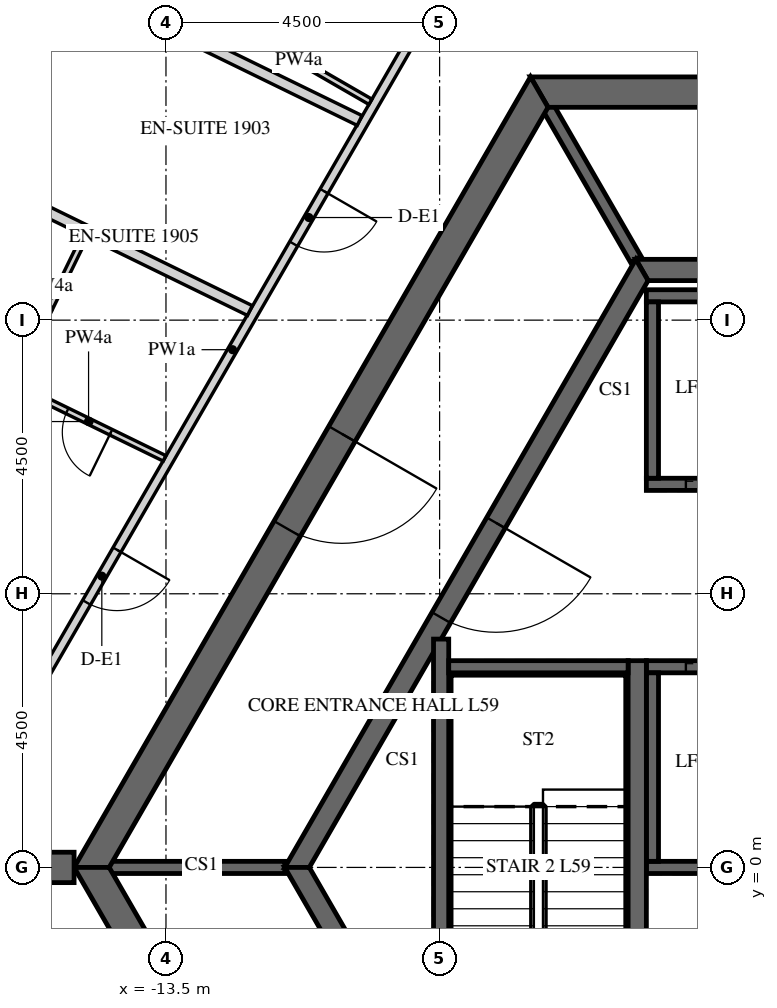
"""IFC4 building model, lengths in metres.
Left out: names, types, materials, properties, quantities, classifications, styles, units other than length and angle.
Written with IfcOpenShell. Run it as: python <this file> out.ifc"""

import sys

from ifc_helpers import new_model, si_unit, direction, frame, frame_2d, origin, place, context, subcontext, project, spatial, polyline, rectangle, outline, extrude, element, fill, save


model = new_model("IFC4")
c1 = context("Model", 3, precision=1e-05, world=origin(), true_north=direction((0.0, 1.0)))
c2 = subcontext(c1, "Body", "Model", "MODEL_VIEW")
j1 = project(units=[si_unit("LENGTHUNIT", "METRE"), si_unit("PLANEANGLEUNIT", "RADIAN")], contexts=[c1])
p1 = place(None, origin())
s1 = spatial("IfcSite", under=j1, at=p1, CompositionType="ELEMENT")
p2 = place(p1, origin())
s2 = spatial("IfcBuilding", under=s1, at=p2, CompositionType="ELEMENT")
p3 = place(p2, frame((0.0, 0.0, 246.3)))
s3 = spatial("IfcBuildingStorey", under=s2, at=p3, CompositionType="ELEMENT", Elevation=246.3)
p4 = place(p3, frame((-7.361, 12.75, -0.15), z_axis=(0.0, 0.0, 1.0), x_axis=(-0.50000571537, -0.866022103989, 0.0)))
e1 = element("IfcWall", 1, at=p4, inside=s3, PredefinedType="SHEAR", context=c2, shape_type="SweptSolid", body=[
    extrude(outline(polyline([(-0.144, -0.25), (14.867, -0.25), (14.578, 0.25), (0.144, 0.25), (-0.144, -0.25)])), origin(), (0.0, 0.0, 1.0), 3.75),
])
p5 = place(p4, frame((6.49, 0.0, 0.15)))
e2 = element("IfcOpeningElement", 2, at=p5, cuts=e1, PredefinedType="OPENING", context=c2, shape_type="SweptSolid", body=[
    extrude(rectangle(XDim=1.8, YDim=2.4, at=frame_2d((0.9, 1.2))), frame((0.0, 0.26, 0.0), z_axis=(0.0, -1.0, 0.0), x_axis=(1.0, 0.0, 0.0)), (0.0, 0.0, 1.0), 0.52),
])
p6 = place(p3, frame((-14.722, 0.0, -0.15), z_axis=(0.0, 0.0, 1.0), x_axis=(0.50000571537, -0.866022103989, 0.0)))
e3 = element("IfcWall", 3, at=p6, inside=s3, PredefinedType="SHEAR", context=c2, shape_type="SweptSolid", body=[
    extrude(outline(polyline([(-0.144, -0.25), (14.867, -0.25), (14.578, 0.25), (0.144, 0.25), (-0.144, -0.25)])), origin(), (0.0, 0.0, 1.0), 3.75),
])
p7 = place(p6, frame((6.432, 0.0, 0.15)))
e4 = element("IfcOpeningElement", 4, at=p7, cuts=e3, PredefinedType="OPENING", context=c2, shape_type="SweptSolid", body=[
    extrude(rectangle(XDim=1.8, YDim=2.4, at=frame_2d((0.9, 1.2))), frame((0.0, 0.26, 0.0), z_axis=(0.0, -1.0, 0.0), x_axis=(1.0, 0.0, 0.0)), (0.0, 0.0, 1.0), 0.52),
])
p8 = place(p3, frame((7.361, 12.75, -0.15), z_axis=(0.0, 0.0, 1.0), x_axis=(-1.0, 0.0, 0.0)))
e5 = element("IfcWall", 5, at=p8, inside=s3, PredefinedType="SHEAR", context=c2, shape_type="SweptSolid", body=[
    extrude(outline(polyline([(-0.144, -0.25), (14.866, -0.25), (14.578, 0.25), (0.144, 0.25), (-0.144, -0.25)])), origin(), (0.0, 0.0, 1.0), 3.75),
])
p9 = place(p8, frame((6.761, 0.0, 0.15)))
e6 = element("IfcOpeningElement", 6, at=p9, cuts=e5, PredefinedType="OPENING", context=c2, shape_type="SweptSolid", body=[
    extrude(rectangle(XDim=1.2, YDim=2.4, at=frame_2d((0.6, 1.2))), frame((0.0, 0.26, 0.0), z_axis=(0.0, -1.0, 0.0), x_axis=(1.0, 0.0, 0.0)), (0.0, 0.0, 1.0), 0.52),
])
p10 = place(p3, frame((-15.011, 0.0, -0.15), z_axis=(0.0, 0.0, 1.0), x_axis=(-1.0, 0.0, 0.0)))
e7 = element("IfcWall", 7, at=p10, inside=s3, PredefinedType="SHEAR", context=c2, shape_type="SweptSolid", body=[
    extrude(rectangle(XDim=15.424, YDim=0.5, at=frame_2d((7.712, 0.0))), origin(), (0.0, 0.0, 1.0), 3.75),
])
p11 = place(p10, frame((6.812, 0.0, 0.15)))
e8 = element("IfcOpeningElement", 8, at=p11, cuts=e7, PredefinedType="OPENING", context=c2, shape_type="SweptSolid", body=[
    extrude(rectangle(XDim=1.8, YDim=2.4, at=frame_2d((0.9, 1.2))), frame((0.0, 0.26, 0.0), z_axis=(0.0, -1.0, 0.0), x_axis=(1.0, 0.0, 0.0)), (0.0, 0.0, 1.0), 0.52),
])
p12 = place(p3, frame((-5.673, 9.825, -0.15), z_axis=(0.0, 0.0, 1.0), x_axis=(-0.499995046907, -0.866028263435, 0.0)))
e9 = element("IfcWall", 9, at=p12, inside=s3, PredefinedType="SHEAR", context=c2, shape_type="SweptSolid", body=[
    extrude(outline(polyline([(-0.101, -0.175), (11.446, -0.175), (11.244, 0.175), (0.101, 0.175), (-0.101, -0.175)])), origin(), (0.0, 0.0, 1.0), 3.75),
])
p13 = place(p12, frame((4.801, 0.0, 0.15)))
e10 = element("IfcOpeningElement", 10, at=p13, cuts=e9, PredefinedType="OPENING", context=c2, shape_type="SweptSolid", body=[
    extrude(rectangle(XDim=1.8, YDim=2.4, at=frame_2d((0.9, 1.2))), frame((0.0, 0.185, 0.0), z_axis=(0.0, -1.0, 0.0), x_axis=(1.0, 0.0, 0.0)), (0.0, 0.0, 1.0), 0.37),
])
p14 = place(p3, frame((-11.345, 0.0, -0.15), z_axis=(0.0, 0.0, 1.0), x_axis=(0.499995046907, -0.866028263435, 0.0)))
e11 = element("IfcWall", 11, at=p14, inside=s3, PredefinedType="SHEAR", context=c2, shape_type="SweptSolid", body=[
    extrude(outline(polyline([(-0.101, -0.175), (11.446, -0.175), (11.244, 0.175), (0.101, 0.175), (-0.101, -0.175)])), origin(), (0.0, 0.0, 1.0), 3.75),
])
p15 = place(p14, frame((4.744, 0.0, 0.15)))
e12 = element("IfcOpeningElement", 12, at=p15, cuts=e11, PredefinedType="OPENING", context=c2, shape_type="SweptSolid", body=[
    extrude(rectangle(XDim=1.8, YDim=2.4, at=frame_2d((0.9, 1.2))), frame((0.0, 0.185, 0.0), z_axis=(0.0, -1.0, 0.0), x_axis=(1.0, 0.0, 0.0)), (0.0, 0.0, 1.0), 0.37),
])
p16 = place(p3, frame((5.673, 9.825, -0.15), z_axis=(0.0, 0.0, 1.0), x_axis=(-1.0, 0.0, 0.0)))
e13 = element("IfcWall", 13, at=p16, inside=s3, PredefinedType="SHEAR", context=c2, shape_type="SweptSolid", body=[
    extrude(outline(polyline([(-0.101, -0.175), (11.446, -0.175), (11.244, 0.175), (0.101, 0.175), (-0.101, -0.175)])), origin(), (0.0, 0.0, 1.0), 3.75),
])
p17 = place(p3, frame((-5.6, 6.3, -0.25), z_axis=(0.0, 0.0, 1.0), x_axis=(1.0, 0.0, 0.0)))
e14 = element("IfcWall", 14, at=p17, inside=s3, PredefinedType="SHEAR", context=c2, shape_type="SweptSolid", body=[
    extrude(rectangle(XDim=11.2, YDim=0.2, at=frame_2d((5.6, 0.0))), origin(), (0.0, 0.0, 1.0), 3.9),
])
p18 = place(p17, frame((8.45, 0.0, 0.25)))
e15 = element("IfcOpeningElement", 15, at=p18, cuts=e14, PredefinedType="OPENING", context=c2, shape_type="SweptSolid", body=[
    extrude(rectangle(XDim=0.9, YDim=2.1, at=frame_2d((0.45, 1.05))), frame((0.0, 0.11, 0.0), z_axis=(0.0, -1.0, 0.0), x_axis=(1.0, 0.0, 0.0)), (0.0, 0.0, 1.0), 0.22),
])
p19 = place(p17, frame((0.65, 0.0, 0.25)))
e16 = element("IfcOpeningElement", 16, at=p19, cuts=e14, PredefinedType="OPENING", context=c2, shape_type="SweptSolid", body=[
    extrude(rectangle(XDim=1.1, YDim=2.1, at=frame_2d((0.55, 1.05))), frame((0.0, 0.11, 0.0), z_axis=(0.0, -1.0, 0.0), x_axis=(1.0, 0.0, 0.0)), (0.0, 0.0, 1.0), 0.22),
])
p20 = place(p17, frame((2.85, 0.0, 0.25)))
e17 = element("IfcOpeningElement", 17, at=p20, cuts=e14, PredefinedType="OPENING", context=c2, shape_type="SweptSolid", body=[
    extrude(rectangle(XDim=1.1, YDim=2.1, at=frame_2d((0.55, 1.05))), frame((0.0, 0.11, 0.0), z_axis=(0.0, -1.0, 0.0), x_axis=(1.0, 0.0, 0.0)), (0.0, 0.0, 1.0), 0.22),
])
p21 = place(p17, frame((5.05, 0.0, 0.25)))
e18 = element("IfcOpeningElement", 18, at=p21, cuts=e14, PredefinedType="OPENING", context=c2, shape_type="SweptSolid", body=[
    extrude(rectangle(XDim=1.1, YDim=2.1, at=frame_2d((0.55, 1.05))), frame((0.0, 0.11, 0.0), z_axis=(0.0, -1.0, 0.0), x_axis=(1.0, 0.0, 0.0)), (0.0, 0.0, 1.0), 0.22),
])
p22 = place(p3, frame((-5.6, 9.4, -0.25), z_axis=(0.0, 0.0, 1.0), x_axis=(1.0, 0.0, 0.0)))
e19 = element("IfcWall", 19, at=p22, inside=s3, PredefinedType="SHEAR", context=c2, shape_type="SweptSolid", body=[
    extrude(rectangle(XDim=11.2, YDim=0.2, at=frame_2d((5.6, 0.0))), origin(), (0.0, 0.0, 1.0), 3.9),
])
p23 = place(p3, frame((-5.5, 6.4, -0.25), z_axis=(0.0, 0.0, 1.0), x_axis=(0.0, 1.0, 0.0)))
e20 = element("IfcWall", 20, at=p23, inside=s3, PredefinedType="SHEAR", context=c2, shape_type="SweptSolid", body=[
    extrude(rectangle(XDim=2.9, YDim=0.2, at=frame_2d((1.45, 0.0))), origin(), (0.0, 0.0, 1.0), 3.9),
])
p24 = place(p3, frame((-5.6, 3.3, -0.25), z_axis=(0.0, 0.0, 1.0), x_axis=(1.0, 0.0, 0.0)))
e21 = element("IfcWall", 21, at=p24, inside=s3, PredefinedType="SHEAR", context=c2, shape_type="SweptSolid", body=[
    extrude(rectangle(XDim=11.2, YDim=0.2, at=frame_2d((5.6, 0.0))), origin(), (0.0, 0.0, 1.0), 3.9),
])
p25 = place(p24, frame((0.65, 0.0, 0.25)))
e22 = element("IfcOpeningElement", 22, at=p25, cuts=e21, PredefinedType="OPENING", context=c2, shape_type="SweptSolid", body=[
    extrude(rectangle(XDim=1.1, YDim=2.1, at=frame_2d((0.55, 1.05))), frame((0.0, 0.11, 0.0), z_axis=(0.0, -1.0, 0.0), x_axis=(1.0, 0.0, 0.0)), (0.0, 0.0, 1.0), 0.22),
])
p26 = place(p24, frame((2.85, 0.0, 0.25)))
e23 = element("IfcOpeningElement", 23, at=p26, cuts=e21, PredefinedType="OPENING", context=c2, shape_type="SweptSolid", body=[
    extrude(rectangle(XDim=1.1, YDim=2.1, at=frame_2d((0.55, 1.05))), frame((0.0, 0.11, 0.0), z_axis=(0.0, -1.0, 0.0), x_axis=(1.0, 0.0, 0.0)), (0.0, 0.0, 1.0), 0.22),
])
p27 = place(p24, frame((5.05, 0.0, 0.25)))
e24 = element("IfcOpeningElement", 24, at=p27, cuts=e21, PredefinedType="OPENING", context=c2, shape_type="SweptSolid", body=[
    extrude(rectangle(XDim=1.1, YDim=2.1, at=frame_2d((0.55, 1.05))), frame((0.0, 0.11, 0.0), z_axis=(0.0, -1.0, 0.0), x_axis=(1.0, 0.0, 0.0)), (0.0, 0.0, 1.0), 0.22),
])
p28 = place(p24, frame((7.25, 0.0, 0.25)))
e25 = element("IfcOpeningElement", 25, at=p28, cuts=e21, PredefinedType="OPENING", context=c2, shape_type="SweptSolid", body=[
    extrude(rectangle(XDim=1.1, YDim=2.1, at=frame_2d((0.55, 1.05))), frame((0.0, 0.11, 0.0), z_axis=(0.0, -1.0, 0.0), x_axis=(1.0, 0.0, 0.0)), (0.0, 0.0, 1.0), 0.22),
])
p29 = place(p24, frame((9.45, 0.0, 0.25)))
e26 = element("IfcOpeningElement", 26, at=p29, cuts=e21, PredefinedType="OPENING", context=c2, shape_type="SweptSolid", body=[
    extrude(rectangle(XDim=1.1, YDim=2.1, at=frame_2d((0.55, 1.05))), frame((0.0, 0.11, 0.0), z_axis=(0.0, -1.0, 0.0), x_axis=(1.0, 0.0, 0.0)), (0.0, 0.0, 1.0), 0.22),
])
p30 = place(p3, frame((-5.6, 0.0, -0.25), z_axis=(0.0, 0.0, 1.0), x_axis=(1.0, 0.0, 0.0)))
e27 = element("IfcWall", 27, at=p30, inside=s3, PredefinedType="SHEAR", context=c2, shape_type="SweptSolid", body=[
    extrude(rectangle(XDim=11.2, YDim=0.2, at=frame_2d((5.6, 0.0))), origin(), (0.0, 0.0, 1.0), 3.9),
])
p31 = place(p3, frame((-5.5, 0.1, -0.25), z_axis=(0.0, 0.0, 1.0), x_axis=(0.0, 1.0, 0.0)))
e28 = element("IfcWall", 28, at=p31, inside=s3, PredefinedType="SHEAR", context=c2, shape_type="SweptSolid", body=[
    extrude(rectangle(XDim=3.1, YDim=0.2, at=frame_2d((1.55, 0.0))), origin(), (0.0, 0.0, 1.0), 3.9),
])
for number, where, z_axis, x_axis in (
    (29, (-5.773, 10.0, -0.15), (0.0, 0.0, 1.0), (-0.5, 0.866, 0.0)),
    (30, (-11.547, 0.0, -0.15), (0.0, 0.0, 1.0), (-1.0, 0.0, 0.0)),
):
    element("IfcWall", number, at=place(p3, frame(where, z_axis=z_axis, x_axis=x_axis)), inside=s3, PredefinedType="SHEAR", context=c2, shape_type="SweptSolid", body=[
        extrude(rectangle(XDim=2.887, YDim=0.2, at=frame_2d((1.443, 0.0))), origin(), (0.0, 0.0, 1.0), 3.75),
    ])
p32 = place(p3, frame((-5.75, -3.4, -0.25), z_axis=(0.0, 0.0, 1.0), x_axis=(0.0, 1.0, 0.0)))
e31 = element("IfcWall", 31, at=p32, inside=s3, PredefinedType="SHEAR", context=c2, shape_type="SweptSolid", body=[
    extrude(rectangle(XDim=6.8, YDim=0.3, at=frame_2d((3.4, 0.0))), origin(), (0.0, 0.0, 1.0), 3.9),
])
p33 = place(p3, frame((-8.975, -3.755, -0.25), z_axis=(0.0, 0.0, 1.0), x_axis=(0.0, 1.0, 0.0)))
e32 = element("IfcWall", 32, at=p33, inside=s3, PredefinedType="SHEAR", context=c2, shape_type="SweptSolid", body=[
    extrude(rectangle(XDim=7.51, YDim=0.25, at=frame_2d((3.755, 0.0))), origin(), (0.0, 0.0, 1.0), 3.9),
])
p34 = place(p3, frame((-8.85, 3.3, -0.25), z_axis=(0.0, 0.0, 1.0), x_axis=(1.0, 0.0, 0.0)))
e33 = element("IfcWall", 33, at=p34, inside=s3, PredefinedType="SHEAR", context=c2, shape_type="SweptSolid", body=[
    extrude(rectangle(XDim=2.95, YDim=0.2, at=frame_2d((1.475, 0.0))), origin(), (0.0, 0.0, 1.0), 3.9),
])
p35 = place(p3, frame((-8.673, 14.978, 0.0), z_axis=(0.0, 0.0, 1.0), x_axis=(-0.50000700621, -0.86602135871, 0.0)))
e34 = element("IfcWall", 34, at=p35, inside=s3, PredefinedType="PARTITIONING", context=c2, shape_type="SweptSolid", body=[
    extrude(rectangle(XDim=14.928, YDim=0.15, at=frame_2d((7.464, 0.0))), origin(), (0.0, 0.0, 1.0), 2.838),
])
p36 = place(p35, frame((4.454, 0.0, 0.0)))
e35 = element("IfcOpeningElement", 35, at=p36, cuts=e34, PredefinedType="OPENING", context=c2, shape_type="SweptSolid", body=[
    extrude(rectangle(XDim=1.0, YDim=2.1, at=frame_2d((0.5, 1.05))), frame((0.0, 0.085, 0.0), z_axis=(0.0, -1.0, 0.0), x_axis=(1.0, 0.0, 0.0)), (0.0, 0.0, 1.0), 0.17),
])
p37 = place(p35, frame((11.264, 0.0, 0.0)))
e36 = element("IfcOpeningElement", 36, at=p37, cuts=e34, PredefinedType="OPENING", context=c2, shape_type="SweptSolid", body=[
    extrude(rectangle(XDim=1.0, YDim=2.1, at=frame_2d((0.5, 1.05))), frame((0.0, 0.085, 0.0), z_axis=(0.0, -1.0, 0.0), x_axis=(1.0, 0.0, 0.0)), (0.0, 0.0, 1.0), 0.17),
])
p38 = place(p3, frame((-10.138, 12.591, 0.0), z_axis=(0.0, 0.0, 1.0), x_axis=(-0.866051307416, 0.49995513091, 0.0)))
e37 = element("IfcWall", 37, at=p38, inside=s3, PredefinedType="PARTITIONING", context=c2, shape_type="SweptSolid", body=[
    extrude(rectangle(XDim=2.725, YDim=0.1, at=frame_2d((1.362, 0.0))), origin(), (0.0, 0.0, 1.0), 2.838),
])
p39 = place(p3, frame((-21.815, 17.892, 0.0), z_axis=(0.0, 0.0, 1.0), x_axis=(0.898799253997, -0.438360469265, 0.0)))
e38 = element("IfcWall", 38, at=p39, inside=s3, PredefinedType="PARTITIONING", context=c2, shape_type="SweptSolid", body=[
    extrude(rectangle(XDim=12.794, YDim=0.18, at=frame_2d((6.397, 0.0))), origin(), (0.0, 0.0, 1.0), 2.838),
])
p40 = place(p3, frame((-23.393, 14.656, 0.0), z_axis=(0.0, 0.0, 1.0), x_axis=(0.898790706576, -0.43837799417, 0.0)))
e39 = element("IfcWall", 39, at=p40, inside=s3, PredefinedType="PARTITIONING", context=c2, shape_type="SweptSolid", body=[
    extrude(rectangle(XDim=12.542, YDim=0.18, at=frame_2d((6.271, 0.0))), origin(), (0.0, 0.0, 1.0), 2.838),
])
p41 = place(p3, frame((-13.523, 6.727, 0.0), z_axis=(0.0, 0.0, 1.0), x_axis=(-0.89880809785, 0.438342335668, 0.0)))
e40 = element("IfcWall", 40, at=p41, inside=s3, PredefinedType="PARTITIONING", context=c2, shape_type="SweptSolid", body=[
    extrude(rectangle(XDim=2.781, YDim=0.1, at=frame_2d((1.391, 0.0))), origin(), (0.0, 0.0, 1.0), 2.838),
])
p42 = place(p41, frame((0.981, 0.0, 0.0)))
e41 = element("IfcOpeningElement", 41, at=p42, cuts=e40, PredefinedType="OPENING", context=c2, shape_type="SweptSolid", body=[
    extrude(rectangle(XDim=0.8, YDim=2.1, at=frame_2d((0.4, 1.05))), frame((0.0, 0.06, 0.0), z_axis=(0.0, -1.0, 0.0), x_axis=(1.0, 0.0, 0.0)), (0.0, 0.0, 1.0), 0.12),
])
p43 = place(p3, frame((-16.001, 7.991, 0.0), z_axis=(0.0, 0.0, 1.0), x_axis=(0.438344066549, 0.89880725371, 0.0)))
e42 = element("IfcWall", 42, at=p43, inside=s3, PredefinedType="PARTITIONING", context=c2, shape_type="SweptSolid", body=[
    extrude(rectangle(XDim=2.66, YDim=0.1, at=frame_2d((1.33, 0.0))), origin(), (0.0, 0.0, 1.0), 2.838),
])
p44 = place(p5, origin())
e43 = element("IfcDoor", 43, at=p44, inside=s3, OperationType="DOUBLE_DOOR_SINGLE_SWING", PredefinedType="DOOR", context=c2, shape_type="SweptSolid", body=[
    extrude(rectangle(XDim=1.8, YDim=2.4, at=frame_2d((0.9, 1.2))), frame((0.0, 0.025, 0.0), z_axis=(0.0, -1.0, 0.0), x_axis=(1.0, 0.0, 0.0)), (0.0, 0.0, 1.0), 0.05),
])
fill(e2, e43)
p45 = place(p13, origin())
e44 = element("IfcDoor", 44, at=p45, inside=s3, OperationType="DOUBLE_DOOR_SINGLE_SWING", PredefinedType="DOOR", context=c2, shape_type="SweptSolid", body=[
    extrude(rectangle(XDim=1.8, YDim=2.4, at=frame_2d((0.9, 1.2))), frame((0.0, 0.025, 0.0), z_axis=(0.0, -1.0, 0.0), x_axis=(1.0, 0.0, 0.0)), (0.0, 0.0, 1.0), 0.05),
])
fill(e10, e44)
p46 = place(p19, origin())
e45 = element("IfcDoor", 45, at=p46, inside=s3, OperationType="SLIDING_TO_LEFT", PredefinedType="DOOR", context=c2, shape_type="SweptSolid", body=[
    extrude(rectangle(XDim=1.1, YDim=2.1, at=frame_2d((0.55, 1.05))), frame((0.0, 0.025, 0.0), z_axis=(0.0, -1.0, 0.0), x_axis=(1.0, 0.0, 0.0)), (0.0, 0.0, 1.0), 0.05),
])
fill(e16, e45)
p47 = place(p25, origin())
e46 = element("IfcDoor", 46, at=p47, inside=s3, OperationType="SLIDING_TO_LEFT", PredefinedType="DOOR", context=c2, shape_type="SweptSolid", body=[
    extrude(rectangle(XDim=1.1, YDim=2.1, at=frame_2d((0.55, 1.05))), frame((0.0, 0.025, 0.0), z_axis=(0.0, -1.0, 0.0), x_axis=(1.0, 0.0, 0.0)), (0.0, 0.0, 1.0), 0.05),
])
fill(e22, e46)
p48 = place(p36, origin())
e47 = element("IfcDoor", 47, at=p48, inside=s3, OperationType="SINGLE_SWING_LEFT", PredefinedType="DOOR", context=c2, shape_type="SweptSolid", body=[
    extrude(rectangle(XDim=1.0, YDim=2.1, at=frame_2d((0.5, 1.05))), frame((0.0, 0.025, 0.0), z_axis=(0.0, -1.0, 0.0), x_axis=(1.0, 0.0, 0.0)), (0.0, 0.0, 1.0), 0.05),
])
fill(e35, e47)
p49 = place(p37, origin())
e48 = element("IfcDoor", 48, at=p49, inside=s3, OperationType="SINGLE_SWING_LEFT", PredefinedType="DOOR", context=c2, shape_type="SweptSolid", body=[
    extrude(rectangle(XDim=1.0, YDim=2.1, at=frame_2d((0.5, 1.05))), frame((0.0, 0.025, 0.0), z_axis=(0.0, -1.0, 0.0), x_axis=(1.0, 0.0, 0.0)), (0.0, 0.0, 1.0), 0.05),
])
fill(e36, e48)
p50 = place(p42, origin())
e49 = element("IfcDoor", 49, at=p50, inside=s3, OperationType="SINGLE_SWING_RIGHT", PredefinedType="DOOR", context=c2, shape_type="SweptSolid", body=[
    extrude(rectangle(XDim=0.8, YDim=2.1, at=frame_2d((0.4, 1.05))), frame((0.0, 0.025, 0.0), z_axis=(0.0, -1.0, 0.0), x_axis=(1.0, 0.0, 0.0)), (0.0, 0.0, 1.0), 0.05),
])
fill(e41, e49)
save(model, sys.argv[1])
